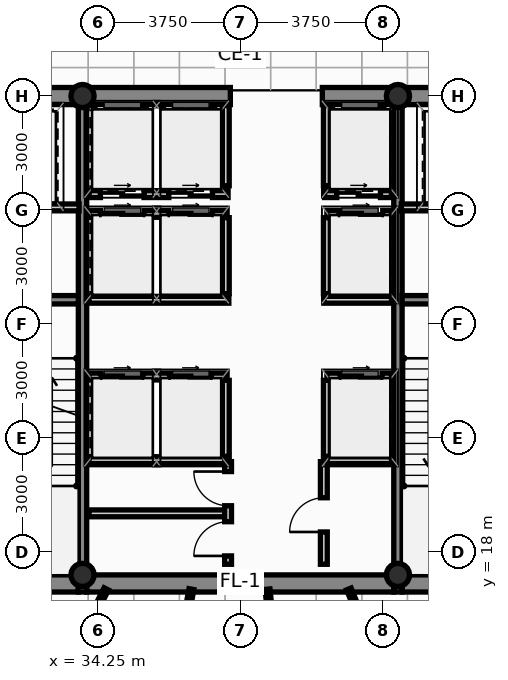
"""IFC4 building model, lengths in metres.
Left out: names, types, materials, properties, quantities, classifications, styles, units other than length and angle.
Written with IfcOpenShell. Run it as: python <this file> out.ifc"""

import sys

from ifc_helpers import new_model, si_unit, direction, frame, frame_2d, origin, origin_2d, place, context, subcontext, project, spatial, rectangle, hollow_circle, extrude, source, transform, mapped, element, fill, save


model = new_model("IFC4")
c1 = context("Model", 3, precision=1e-05, world=origin(), true_north=direction((0.0, 1.0)))
c2 = subcontext(c1, "Body", "Model", "MODEL_VIEW")
j1 = project(units=[si_unit("LENGTHUNIT", "METRE"), si_unit("PLANEANGLEUNIT", "RADIAN")], contexts=[c1])
p1 = place(None, origin())
s1 = spatial("IfcSite", under=j1, at=p1, CompositionType="ELEMENT")
p2 = place(p1, origin())
s2 = spatial("IfcBuilding", under=s1, at=p2, CompositionType="ELEMENT")
p3 = place(p2, frame((0.0, 0.0, 127.3)))
s3 = spatial("IfcBuildingStorey", under=s2, at=p3, CompositionType="ELEMENT", Elevation=127.3)
m1 = source(origin(), c2, "Body", "SweptSolid", [
    extrude(hollow_circle(Radius=0.305, WallThickness=0.025, at=origin_2d()), origin(), (0.0, 0.0, 1.0), 4.5),
])
for number, where, z_axis, x_axis in (
    (1, (33.85, 17.4, 0.0), (0.0, 0.0, 1.0), (1.0, 0.0, 0.0)),
    (2, (42.15, 17.4, 0.0), (0.0, 0.0, 1.0), (1.0, 0.0, 0.0)),
    (3, (33.85, 30.0, 0.0), (0.0, 0.0, 1.0), (1.0, 0.0, 0.0)),
    (4, (42.15, 30.0, 0.0), (0.0, 0.0, 1.0), (1.0, 0.0, 0.0)),
):
    element("IfcColumn", number, at=place(p3, frame(where, z_axis=z_axis, x_axis=x_axis)), inside=s3, PredefinedType="COLUMN", context=c2, shape_type="MappedRepresentation", body=[
        mapped(m1, transform((0.0, 0.0, 0.0), scale=1.0)),
    ])
p4 = place(p3, frame((30.84, 17.175, 0.0), z_axis=(0.0, 0.0, 1.0), x_axis=(1.0, 0.0, 0.0)))
e5 = element("IfcWall", 5, at=p4, inside=s3, PredefinedType="SHEAR", context=c2, shape_type="SweptSolid", body=[
    extrude(rectangle(XDim=2.9, YDim=0.45, at=frame_2d((1.45, 0.0))), origin(), (0.0, 0.0, 1.0), 4.5),
])
p5 = place(p3, frame((33.96, 17.175, 0.0), z_axis=(0.0, 0.0, 1.0), x_axis=(1.0, 0.0, 0.0)))
e6 = element("IfcWall", 6, at=p5, inside=s3, PredefinedType="SHEAR", context=c2, shape_type="SweptSolid", body=[
    extrude(rectangle(XDim=8.08, YDim=0.45, at=frame_2d((4.04, 0.0))), origin(), (0.0, 0.0, 1.0), 4.5),
])
for number, where, z_axis, x_axis in (
    (7, (42.26, 17.175, 0.0), (0.0, 0.0, 1.0), (1.0, 0.0, 0.0)),
    (8, (30.84, 30.0, 0.0), (0.0, 0.0, 1.0), (1.0, 0.0, 0.0)),
):
    element("IfcWall", number, at=place(p3, frame(where, z_axis=z_axis, x_axis=x_axis)), inside=s3, PredefinedType="SHEAR", context=c2, shape_type="SweptSolid", body=[
        extrude(rectangle(XDim=2.9, YDim=0.45, at=frame_2d((1.45, 0.0))), origin(), (0.0, 0.0, 1.0), 4.5),
    ])
p6 = place(p3, frame((33.96, 30.0, 0.0), z_axis=(0.0, 0.0, 1.0), x_axis=(1.0, 0.0, 0.0)))
e9 = element("IfcWall", 9, at=p6, inside=s3, PredefinedType="SHEAR", context=c2, shape_type="SweptSolid", body=[
    extrude(rectangle(XDim=3.78, YDim=0.45, at=frame_2d((1.89, 0.0))), origin(), (0.0, 0.0, 1.0), 4.5),
])
p7 = place(p3, frame((40.16, 30.0, 0.0), z_axis=(0.0, 0.0, 1.0), x_axis=(1.0, 0.0, 0.0)))
e10 = element("IfcWall", 10, at=p7, inside=s3, PredefinedType="SHEAR", context=c2, shape_type="SweptSolid", body=[
    extrude(rectangle(XDim=1.88, YDim=0.45, at=frame_2d((0.94, 0.0))), origin(), (0.0, 0.0, 1.0), 4.5),
])
p8 = place(p3, frame((42.26, 30.0, 0.0), z_axis=(0.0, 0.0, 1.0), x_axis=(1.0, 0.0, 0.0)))
e11 = element("IfcWall", 11, at=p8, inside=s3, PredefinedType="SHEAR", context=c2, shape_type="SweptSolid", body=[
    extrude(rectangle(XDim=2.9, YDim=0.45, at=frame_2d((1.45, 0.0))), origin(), (0.0, 0.0, 1.0), 4.5),
])
for number, where, z_axis, x_axis in (
    (12, (33.85, 16.95, 0.0), (0.0, 0.0, 1.0), (0.0, 1.0, 0.0)),
    (13, (42.15, 16.95, 0.0), (0.0, 0.0, 1.0), (0.0, 1.0, 0.0)),
):
    element("IfcWall", number, at=place(p3, frame(where, z_axis=z_axis, x_axis=x_axis)), inside=s3, PredefinedType="SHEAR", context=c2, shape_type="SweptSolid", body=[
        extrude(rectangle(XDim=13.275, YDim=0.22, at=frame_2d((6.638, 0.0))), origin(), (0.0, 0.0, 1.0), 4.5),
    ])
for number, where, z_axis, x_axis in (
    (14, (30.84, 24.64, 0.0), (0.0, 0.0, 1.0), (1.0, 0.0, 0.0)),
    (15, (42.26, 24.64, 0.0), (0.0, 0.0, 1.0), (1.0, 0.0, 0.0)),
):
    element("IfcWall", number, at=place(p3, frame(where, z_axis=z_axis, x_axis=x_axis)), inside=s3, PredefinedType="SHEAR", context=c2, shape_type="SweptSolid", body=[
        extrude(rectangle(XDim=2.9, YDim=0.22, at=frame_2d((1.45, 0.0))), origin(), (0.0, 0.0, 1.0), 4.5),
    ])
p9 = place(p3, frame((34.02, 22.62, 0.0), z_axis=(0.0, 0.0, 1.0), x_axis=(1.0, 0.0, 0.0)))
e16 = element("IfcWall", 16, at=p9, inside=s3, PredefinedType="PARTITIONING", context=c2, shape_type="SweptSolid", body=[
    extrude(rectangle(XDim=3.6, YDim=0.18, at=frame_2d((1.8, 0.0))), origin(), (0.0, 0.0, 1.0), 4.25),
])
p10 = place(p9, frame((0.32, 0.0, 0.0)))
e17 = element("IfcOpeningElement", 17, at=p10, cuts=e16, PredefinedType="OPENING", context=c2, shape_type="SweptSolid", body=[
    extrude(rectangle(XDim=1.1, YDim=2.2, at=frame_2d((0.55, 1.1))), frame((0.0, 0.102, 0.0), z_axis=(0.0, -1.0, 0.0), x_axis=(1.0, 0.0, 0.0)), (0.0, 0.0, 1.0), 0.204),
])
p11 = place(p9, frame((2.12, 0.0, 0.0)))
e18 = element("IfcOpeningElement", 18, at=p11, cuts=e16, PredefinedType="OPENING", context=c2, shape_type="SweptSolid", body=[
    extrude(rectangle(XDim=1.1, YDim=2.2, at=frame_2d((0.55, 1.1))), frame((0.0, 0.102, 0.0), z_axis=(0.0, -1.0, 0.0), x_axis=(1.0, 0.0, 0.0)), (0.0, 0.0, 1.0), 0.204),
])
p12 = place(p3, frame((40.28, 22.62, 0.0), z_axis=(0.0, 0.0, 1.0), x_axis=(1.0, 0.0, 0.0)))
e19 = element("IfcWall", 19, at=p12, inside=s3, PredefinedType="PARTITIONING", context=c2, shape_type="SweptSolid", body=[
    extrude(rectangle(XDim=1.7, YDim=0.18, at=frame_2d((0.85, 0.0))), origin(), (0.0, 0.0, 1.0), 4.25),
])
p13 = place(p12, frame((0.35, 0.0, 0.0)))
e20 = element("IfcOpeningElement", 20, at=p13, cuts=e19, PredefinedType="OPENING", context=c2, shape_type="SweptSolid", body=[
    extrude(rectangle(XDim=1.1, YDim=2.2, at=frame_2d((0.55, 1.1))), frame((0.0, 0.102, 0.0), z_axis=(0.0, -1.0, 0.0), x_axis=(1.0, 0.0, 0.0)), (0.0, 0.0, 1.0), 0.204),
])
for number, where, z_axis, x_axis in (
    (21, (37.62, 20.52, 0.0), (0.0, 0.0, 1.0), (0.0, 1.0, 0.0)),
    (22, (40.28, 20.52, 0.0), (0.0, 0.0, 1.0), (0.0, 1.0, 0.0)),
):
    element("IfcWall", number, at=place(p3, frame(where, z_axis=z_axis, x_axis=x_axis)), inside=s3, PredefinedType="PARTITIONING", context=c2, shape_type="SweptSolid", body=[
        extrude(rectangle(XDim=2.0, YDim=0.18, at=frame_2d((1.0, 0.0))), origin(), (0.0, 0.0, 1.0), 4.25),
    ])
p14 = place(p3, frame((34.02, 26.9, 0.0), z_axis=(0.0, 0.0, 1.0), x_axis=(1.0, 0.0, 0.0)))
e23 = element("IfcWall", 23, at=p14, inside=s3, PredefinedType="PARTITIONING", context=c2, shape_type="SweptSolid", body=[
    extrude(rectangle(XDim=3.6, YDim=0.18, at=frame_2d((1.8, 0.0))), origin(), (0.0, 0.0, 1.0), 4.25),
])
p15 = place(p14, frame((0.3, 0.0, 0.0)))
e24 = element("IfcOpeningElement", 24, at=p15, cuts=e23, PredefinedType="OPENING", context=c2, shape_type="SweptSolid", body=[
    extrude(rectangle(XDim=1.15, YDim=2.2, at=frame_2d((0.575, 1.1))), frame((0.0, 0.102, 0.0), z_axis=(0.0, -1.0, 0.0), x_axis=(1.0, 0.0, 0.0)), (0.0, 0.0, 1.0), 0.204),
])
p16 = place(p14, frame((2.1, 0.0, 0.0)))
e25 = element("IfcOpeningElement", 25, at=p16, cuts=e23, PredefinedType="OPENING", context=c2, shape_type="SweptSolid", body=[
    extrude(rectangle(XDim=1.15, YDim=2.2, at=frame_2d((0.575, 1.1))), frame((0.0, 0.102, 0.0), z_axis=(0.0, -1.0, 0.0), x_axis=(1.0, 0.0, 0.0)), (0.0, 0.0, 1.0), 0.204),
])
p17 = place(p3, frame((40.28, 26.9, 0.0), z_axis=(0.0, 0.0, 1.0), x_axis=(1.0, 0.0, 0.0)))
e26 = element("IfcWall", 26, at=p17, inside=s3, PredefinedType="PARTITIONING", context=c2, shape_type="SweptSolid", body=[
    extrude(rectangle(XDim=1.7, YDim=0.18, at=frame_2d((0.85, 0.0))), origin(), (0.0, 0.0, 1.0), 4.25),
])
p18 = place(p17, frame((0.32, 0.0, 0.0)))
e27 = element("IfcOpeningElement", 27, at=p18, cuts=e26, PredefinedType="OPENING", context=c2, shape_type="SweptSolid", body=[
    extrude(rectangle(XDim=1.15, YDim=2.2, at=frame_2d((0.575, 1.1))), frame((0.0, 0.102, 0.0), z_axis=(0.0, -1.0, 0.0), x_axis=(1.0, 0.0, 0.0)), (0.0, 0.0, 1.0), 0.204),
])
for number, where, z_axis, x_axis in (
    (28, (37.62, 24.8, 0.0), (0.0, 0.0, 1.0), (0.0, 1.0, 0.0)),
    (29, (40.28, 24.8, 0.0), (0.0, 0.0, 1.0), (0.0, 1.0, 0.0)),
):
    element("IfcWall", number, at=place(p3, frame(where, z_axis=z_axis, x_axis=x_axis)), inside=s3, PredefinedType="PARTITIONING", context=c2, shape_type="SweptSolid", body=[
        extrude(rectangle(XDim=2.0, YDim=0.18, at=frame_2d((1.0, 0.0))), origin(), (0.0, 0.0, 1.0), 4.25),
    ])
p19 = place(p3, frame((34.02, 24.64, 0.0), z_axis=(0.0, 0.0, 1.0), x_axis=(1.0, 0.0, 0.0)))
e30 = element("IfcWall", 30, at=p19, inside=s3, PredefinedType="PARTITIONING", context=c2, shape_type="SweptSolid", body=[
    extrude(rectangle(XDim=3.68, YDim=0.18, at=frame_2d((1.84, 0.0))), origin(), (0.0, 0.0, 1.0), 4.25),
])
p20 = place(p3, frame((40.2, 24.64, 0.0), z_axis=(0.0, 0.0, 1.0), x_axis=(1.0, 0.0, 0.0)))
e31 = element("IfcWall", 31, at=p20, inside=s3, PredefinedType="PARTITIONING", context=c2, shape_type="SweptSolid", body=[
    extrude(rectangle(XDim=1.78, YDim=0.18, at=frame_2d((0.89, 0.0))), origin(), (0.0, 0.0, 1.0), 4.25),
])
p21 = place(p3, frame((34.02, 27.42, 0.0), z_axis=(0.0, 0.0, 1.0), x_axis=(1.0, 0.0, 0.0)))
e32 = element("IfcWall", 32, at=p21, inside=s3, PredefinedType="PARTITIONING", context=c2, shape_type="SweptSolid", body=[
    extrude(rectangle(XDim=3.66, YDim=0.18, at=frame_2d((1.83, 0.0))), origin(), (0.0, 0.0, 1.0), 4.25),
])
p22 = place(p21, frame((0.3, 0.0, 0.0)))
e33 = element("IfcOpeningElement", 33, at=p22, cuts=e32, PredefinedType="OPENING", context=c2, shape_type="SweptSolid", body=[
    extrude(rectangle(XDim=1.15, YDim=2.2, at=frame_2d((0.575, 1.1))), frame((0.0, 0.102, 0.0), z_axis=(0.0, -1.0, 0.0), x_axis=(1.0, 0.0, 0.0)), (0.0, 0.0, 1.0), 0.204),
])
p23 = place(p21, frame((2.1, 0.0, 0.0)))
e34 = element("IfcOpeningElement", 34, at=p23, cuts=e32, PredefinedType="OPENING", context=c2, shape_type="SweptSolid", body=[
    extrude(rectangle(XDim=1.15, YDim=2.2, at=frame_2d((0.575, 1.1))), frame((0.0, 0.102, 0.0), z_axis=(0.0, -1.0, 0.0), x_axis=(1.0, 0.0, 0.0)), (0.0, 0.0, 1.0), 0.204),
])
p24 = place(p3, frame((40.22, 27.42, 0.0), z_axis=(0.0, 0.0, 1.0), x_axis=(1.0, 0.0, 0.0)))
e35 = element("IfcWall", 35, at=p24, inside=s3, PredefinedType="PARTITIONING", context=c2, shape_type="SweptSolid", body=[
    extrude(rectangle(XDim=1.76, YDim=0.18, at=frame_2d((0.88, 0.0))), origin(), (0.0, 0.0, 1.0), 4.25),
])
p25 = place(p24, frame((0.32, 0.0, 0.0)))
e36 = element("IfcOpeningElement", 36, at=p25, cuts=e35, PredefinedType="OPENING", context=c2, shape_type="SweptSolid", body=[
    extrude(rectangle(XDim=1.15, YDim=2.2, at=frame_2d((0.575, 1.1))), frame((0.0, 0.102, 0.0), z_axis=(0.0, -1.0, 0.0), x_axis=(1.0, 0.0, 0.0)), (0.0, 0.0, 1.0), 0.204),
])
for number, where, z_axis, x_axis in (
    (37, (37.62, 27.64, 0.0), (0.0, 0.0, 1.0), (0.0, 1.0, 0.0)),
    (38, (40.28, 27.64, 0.0), (0.0, 0.0, 1.0), (0.0, 1.0, 0.0)),
):
    element("IfcWall", number, at=place(p3, frame(where, z_axis=z_axis, x_axis=x_axis)), inside=s3, PredefinedType="PARTITIONING", context=c2, shape_type="SweptSolid", body=[
        extrude(rectangle(XDim=2.11, YDim=0.18, at=frame_2d((1.055, 0.0))), origin(), (0.0, 0.0, 1.0), 4.25),
    ])
for number, where, z_axis, x_axis in (
    (39, (30.86, 27.07, 0.0), (0.0, 0.0, 1.0), (1.0, 0.0, 0.0)),
    (40, (42.24, 27.07, 0.0), (0.0, 0.0, 1.0), (1.0, 0.0, 0.0)),
):
    element("IfcWall", number, at=place(p3, frame(where, z_axis=z_axis, x_axis=x_axis)), inside=s3, PredefinedType="PARTITIONING", context=c2, shape_type="SweptSolid", body=[
        extrude(rectangle(XDim=2.9, YDim=0.18, at=frame_2d((1.45, 0.0))), origin(), (0.0, 0.0, 1.0), 4.25),
    ])
p26 = place(p3, frame((34.02, 20.42, 0.0), z_axis=(0.0, 0.0, 1.0), x_axis=(1.0, 0.0, 0.0)))
e41 = element("IfcWall", 41, at=p26, inside=s3, PredefinedType="PARTITIONING", context=c2, shape_type="SweptSolid", body=[
    extrude(rectangle(XDim=3.64, YDim=0.18, at=frame_2d((1.82, 0.0))), origin(), (0.0, 0.0, 1.0), 4.25),
])
p27 = place(p3, frame((40.22, 20.42, 0.0), z_axis=(0.0, 0.0, 1.0), x_axis=(1.0, 0.0, 0.0)))
e42 = element("IfcWall", 42, at=p27, inside=s3, PredefinedType="PARTITIONING", context=c2, shape_type="SweptSolid", body=[
    extrude(rectangle(XDim=1.76, YDim=0.18, at=frame_2d((0.88, 0.0))), origin(), (0.0, 0.0, 1.0), 4.25),
])
p28 = place(p3, frame((34.02, 19.02, 0.0), z_axis=(0.0, 0.0, 1.0), x_axis=(1.0, 0.0, 0.0)))
e43 = element("IfcWall", 43, at=p28, inside=s3, PredefinedType="PARTITIONING", context=c2, shape_type="SweptSolid", body=[
    extrude(rectangle(XDim=3.58, YDim=0.18, at=frame_2d((1.79, 0.0))), origin(), (0.0, 0.0, 1.0), 4.25),
])
p29 = place(p3, frame((37.68, 17.68, 0.0), z_axis=(0.0, 0.0, 1.0), x_axis=(0.0, 1.0, 0.0)))
e44 = element("IfcWall", 44, at=p29, inside=s3, PredefinedType="PARTITIONING", context=c2, shape_type="SweptSolid", body=[
    extrude(rectangle(XDim=2.7, YDim=0.18, at=frame_2d((1.35, 0.0))), origin(), (0.0, 0.0, 1.0), 4.25),
])
p30 = place(p29, frame((0.22, 0.0, 0.0)))
e45 = element("IfcOpeningElement", 45, at=p30, cuts=e44, PredefinedType="OPENING", context=c2, shape_type="SweptSolid", body=[
    extrude(rectangle(XDim=0.9, YDim=2.1, at=frame_2d((0.45, 1.05))), frame((0.0, 0.102, 0.0), z_axis=(0.0, -1.0, 0.0), x_axis=(1.0, 0.0, 0.0)), (0.0, 0.0, 1.0), 0.204),
])
p31 = place(p29, frame((1.54, 0.0, 0.0)))
e46 = element("IfcOpeningElement", 46, at=p31, cuts=e44, PredefinedType="OPENING", context=c2, shape_type="SweptSolid", body=[
    extrude(rectangle(XDim=0.9, YDim=2.1, at=frame_2d((0.45, 1.05))), frame((0.0, 0.102, 0.0), z_axis=(0.0, -1.0, 0.0), x_axis=(1.0, 0.0, 0.0)), (0.0, 0.0, 1.0), 0.204),
])
p32 = place(p3, frame((40.2, 17.68, 0.0), z_axis=(0.0, 0.0, 1.0), x_axis=(0.0, 1.0, 0.0)))
e47 = element("IfcWall", 47, at=p32, inside=s3, PredefinedType="PARTITIONING", context=c2, shape_type="SweptSolid", body=[
    extrude(rectangle(XDim=2.7, YDim=0.18, at=frame_2d((1.35, 0.0))), origin(), (0.0, 0.0, 1.0), 4.25),
])
p33 = place(p32, frame((0.85, 0.0, 0.0)))
e48 = element("IfcOpeningElement", 48, at=p33, cuts=e47, PredefinedType="OPENING", context=c2, shape_type="SweptSolid", body=[
    extrude(rectangle(XDim=0.9, YDim=2.1, at=frame_2d((0.45, 1.05))), frame((0.0, 0.102, 0.0), z_axis=(0.0, -1.0, 0.0), x_axis=(1.0, 0.0, 0.0)), (0.0, 0.0, 1.0), 0.204),
])
p34 = place(p3, frame((28.769, 5.747, 0.0), z_axis=(0.0, 0.0, 1.0), x_axis=(0.451262780951, 0.892391115223, 0.0)))
e49 = element("IfcWall", 49, at=p34, inside=s3, PredefinedType="PARTITIONING", context=c2, shape_type="SweptSolid", body=[
    extrude(rectangle(XDim=12.647, YDim=0.13, at=frame_2d((6.324, 0.0))), origin(), (0.0, 0.0, 1.0), 4.25),
])
p35 = place(p34, frame((5.898, 0.0, 0.0)))
e50 = element("IfcOpeningElement", 50, at=p35, cuts=e49, PredefinedType="OPENING", context=c2, shape_type="SweptSolid", body=[
    extrude(rectangle(XDim=0.96, YDim=2.15, at=frame_2d((0.48, 1.075))), frame((0.0, 0.077, 0.0), z_axis=(0.0, -1.0, 0.0), x_axis=(1.0, 0.0, 0.0)), (0.0, 0.0, 1.0), 0.154),
])
p36 = place(p3, frame((40.858, 17.031, 0.0), z_axis=(0.0, 0.0, 1.0), x_axis=(0.37877899571, -0.925487154103, 0.0)))
e51 = element("IfcWall", 51, at=p36, inside=s3, PredefinedType="PARTITIONING", context=c2, shape_type="SweptSolid", body=[
    extrude(rectangle(XDim=11.968, YDim=0.13, at=frame_2d((5.984, 0.0))), origin(), (0.0, 0.0, 1.0), 4.25),
])
p37 = place(p36, frame((5.555, 0.0, 0.0)))
e52 = element("IfcOpeningElement", 52, at=p37, cuts=e51, PredefinedType="OPENING", context=c2, shape_type="SweptSolid", body=[
    extrude(rectangle(XDim=0.96, YDim=2.15, at=frame_2d((0.48, 1.075))), frame((0.0, 0.077, 0.0), z_axis=(0.0, -1.0, 0.0), x_axis=(1.0, 0.0, 0.0)), (0.0, 0.0, 1.0), 0.154),
])
p38 = place(p3, frame((34.648, 5.82, 0.0), z_axis=(0.0, 0.0, 1.0), x_axis=(0.181454718714, 0.983399300923, 0.0)))
e53 = element("IfcWall", 53, at=p38, inside=s3, PredefinedType="PARTITIONING", context=c2, shape_type="SweptSolid", body=[
    extrude(rectangle(XDim=11.395, YDim=0.13, at=frame_2d((5.697, 0.0))), origin(), (0.0, 0.0, 1.0), 4.25),
])
p39 = place(p38, frame((5.268, 0.0, 0.0)))
e54 = element("IfcOpeningElement", 54, at=p39, cuts=e53, PredefinedType="OPENING", context=c2, shape_type="SweptSolid", body=[
    extrude(rectangle(XDim=0.96, YDim=2.15, at=frame_2d((0.48, 1.075))), frame((0.0, 0.077, 0.0), z_axis=(0.0, -1.0, 0.0), x_axis=(1.0, 0.0, 0.0)), (0.0, 0.0, 1.0), 0.154),
])
p40 = place(p3, frame((38.718, 17.025, 0.0), z_axis=(0.0, 0.0, 1.0), x_axis=(0.102876837546, -0.994694101871, 0.0)))
e55 = element("IfcWall", 55, at=p40, inside=s3, PredefinedType="PARTITIONING", context=c2, shape_type="SweptSolid", body=[
    extrude(rectangle(XDim=11.199, YDim=0.13, at=frame_2d((5.599, 0.0))), origin(), (0.0, 0.0, 1.0), 4.25),
])
p41 = place(p40, frame((5.167, 0.0, 0.0)))
e56 = element("IfcOpeningElement", 56, at=p41, cuts=e55, PredefinedType="OPENING", context=c2, shape_type="SweptSolid", body=[
    extrude(rectangle(XDim=0.96, YDim=2.15, at=frame_2d((0.48, 1.075))), frame((0.0, 0.077, 0.0), z_axis=(0.0, -1.0, 0.0), x_axis=(1.0, 0.0, 0.0)), (0.0, 0.0, 1.0), 0.154),
])
p42 = place(p10, origin())
e57 = element("IfcDoor", 57, at=p42, inside=s3, OperationType="SLIDING_TO_LEFT", PredefinedType="DOOR", context=c2, shape_type="SweptSolid", body=[
    extrude(rectangle(XDim=1.1, YDim=2.2, at=frame_2d((0.55, 1.1))), frame((0.0, 0.025, 0.0), z_axis=(0.0, -1.0, 0.0), x_axis=(1.0, 0.0, 0.0)), (0.0, 0.0, 1.0), 0.05),
])
fill(e17, e57)
p43 = place(p11, origin())
e58 = element("IfcDoor", 58, at=p43, inside=s3, OperationType="SLIDING_TO_RIGHT", PredefinedType="DOOR", context=c2, shape_type="SweptSolid", body=[
    extrude(rectangle(XDim=1.1, YDim=2.2, at=frame_2d((0.55, 1.1))), frame((0.0, 0.025, 0.0), z_axis=(0.0, -1.0, 0.0), x_axis=(1.0, 0.0, 0.0)), (0.0, 0.0, 1.0), 0.05),
])
fill(e18, e58)
p44 = place(p13, origin())
e59 = element("IfcDoor", 59, at=p44, inside=s3, OperationType="SLIDING_TO_LEFT", PredefinedType="DOOR", context=c2, shape_type="SweptSolid", body=[
    extrude(rectangle(XDim=1.1, YDim=2.2, at=frame_2d((0.55, 1.1))), frame((0.0, 0.025, 0.0), z_axis=(0.0, -1.0, 0.0), x_axis=(1.0, 0.0, 0.0)), (0.0, 0.0, 1.0), 0.05),
])
fill(e20, e59)
p45 = place(p15, origin())
e60 = element("IfcDoor", 60, at=p45, inside=s3, OperationType="SLIDING_TO_LEFT", PredefinedType="DOOR", context=c2, shape_type="SweptSolid", body=[
    extrude(rectangle(XDim=1.15, YDim=2.2, at=frame_2d((0.575, 1.1))), frame((0.0, 0.025, 0.0), z_axis=(0.0, -1.0, 0.0), x_axis=(1.0, 0.0, 0.0)), (0.0, 0.0, 1.0), 0.05),
])
fill(e24, e60)
p46 = place(p16, origin())
e61 = element("IfcDoor", 61, at=p46, inside=s3, OperationType="SLIDING_TO_RIGHT", PredefinedType="DOOR", context=c2, shape_type="SweptSolid", body=[
    extrude(rectangle(XDim=1.15, YDim=2.2, at=frame_2d((0.575, 1.1))), frame((0.0, 0.025, 0.0), z_axis=(0.0, -1.0, 0.0), x_axis=(1.0, 0.0, 0.0)), (0.0, 0.0, 1.0), 0.05),
])
fill(e25, e61)
p47 = place(p18, origin())
e62 = element("IfcDoor", 62, at=p47, inside=s3, OperationType="SLIDING_TO_LEFT", PredefinedType="DOOR", context=c2, shape_type="SweptSolid", body=[
    extrude(rectangle(XDim=1.15, YDim=2.2, at=frame_2d((0.575, 1.1))), frame((0.0, 0.025, 0.0), z_axis=(0.0, -1.0, 0.0), x_axis=(1.0, 0.0, 0.0)), (0.0, 0.0, 1.0), 0.05),
])
fill(e27, e62)
p48 = place(p22, origin())
e63 = element("IfcDoor", 63, at=p48, inside=s3, OperationType="SLIDING_TO_RIGHT", PredefinedType="DOOR", context=c2, shape_type="SweptSolid", body=[
    extrude(rectangle(XDim=1.15, YDim=2.2, at=frame_2d((0.575, 1.1))), frame((0.0, 0.025, 0.0), z_axis=(0.0, -1.0, 0.0), x_axis=(1.0, 0.0, 0.0)), (0.0, 0.0, 1.0), 0.05),
])
fill(e33, e63)
p49 = place(p23, origin())
e64 = element("IfcDoor", 64, at=p49, inside=s3, OperationType="SLIDING_TO_LEFT", PredefinedType="DOOR", context=c2, shape_type="SweptSolid", body=[
    extrude(rectangle(XDim=1.15, YDim=2.2, at=frame_2d((0.575, 1.1))), frame((0.0, 0.025, 0.0), z_axis=(0.0, -1.0, 0.0), x_axis=(1.0, 0.0, 0.0)), (0.0, 0.0, 1.0), 0.05),
])
fill(e34, e64)
p50 = place(p25, origin())
e65 = element("IfcDoor", 65, at=p50, inside=s3, OperationType="SLIDING_TO_RIGHT", PredefinedType="DOOR", context=c2, shape_type="SweptSolid", body=[
    extrude(rectangle(XDim=1.15, YDim=2.2, at=frame_2d((0.575, 1.1))), frame((0.0, 0.025, 0.0), z_axis=(0.0, -1.0, 0.0), x_axis=(1.0, 0.0, 0.0)), (0.0, 0.0, 1.0), 0.05),
])
fill(e36, e65)
p51 = place(p30, origin())
e66 = element("IfcDoor", 66, at=p51, inside=s3, OperationType="SINGLE_SWING_LEFT", PredefinedType="DOOR", context=c2, shape_type="SweptSolid", body=[
    extrude(rectangle(XDim=0.9, YDim=2.1, at=frame_2d((0.45, 1.05))), frame((0.0, 0.025, 0.0), z_axis=(0.0, -1.0, 0.0), x_axis=(1.0, 0.0, 0.0)), (0.0, 0.0, 1.0), 0.05),
])
fill(e45, e66)
p52 = place(p31, origin())
e67 = element("IfcDoor", 67, at=p52, inside=s3, OperationType="SINGLE_SWING_RIGHT", PredefinedType="DOOR", context=c2, shape_type="SweptSolid", body=[
    extrude(rectangle(XDim=0.9, YDim=2.1, at=frame_2d((0.45, 1.05))), frame((0.0, 0.025, 0.0), z_axis=(0.0, -1.0, 0.0), x_axis=(1.0, 0.0, 0.0)), (0.0, 0.0, 1.0), 0.05),
])
fill(e46, e67)
p53 = place(p33, origin())
e68 = element("IfcDoor", 68, at=p53, inside=s3, OperationType="SINGLE_SWING_LEFT", PredefinedType="DOOR", context=c2, shape_type="SweptSolid", body=[
    extrude(rectangle(XDim=0.9, YDim=2.1, at=frame_2d((0.45, 1.05))), frame((0.0, 0.025, 0.0), z_axis=(0.0, -1.0, 0.0), x_axis=(1.0, 0.0, 0.0)), (0.0, 0.0, 1.0), 0.05),
])
fill(e48, e68)
save(model, sys.argv[1])
